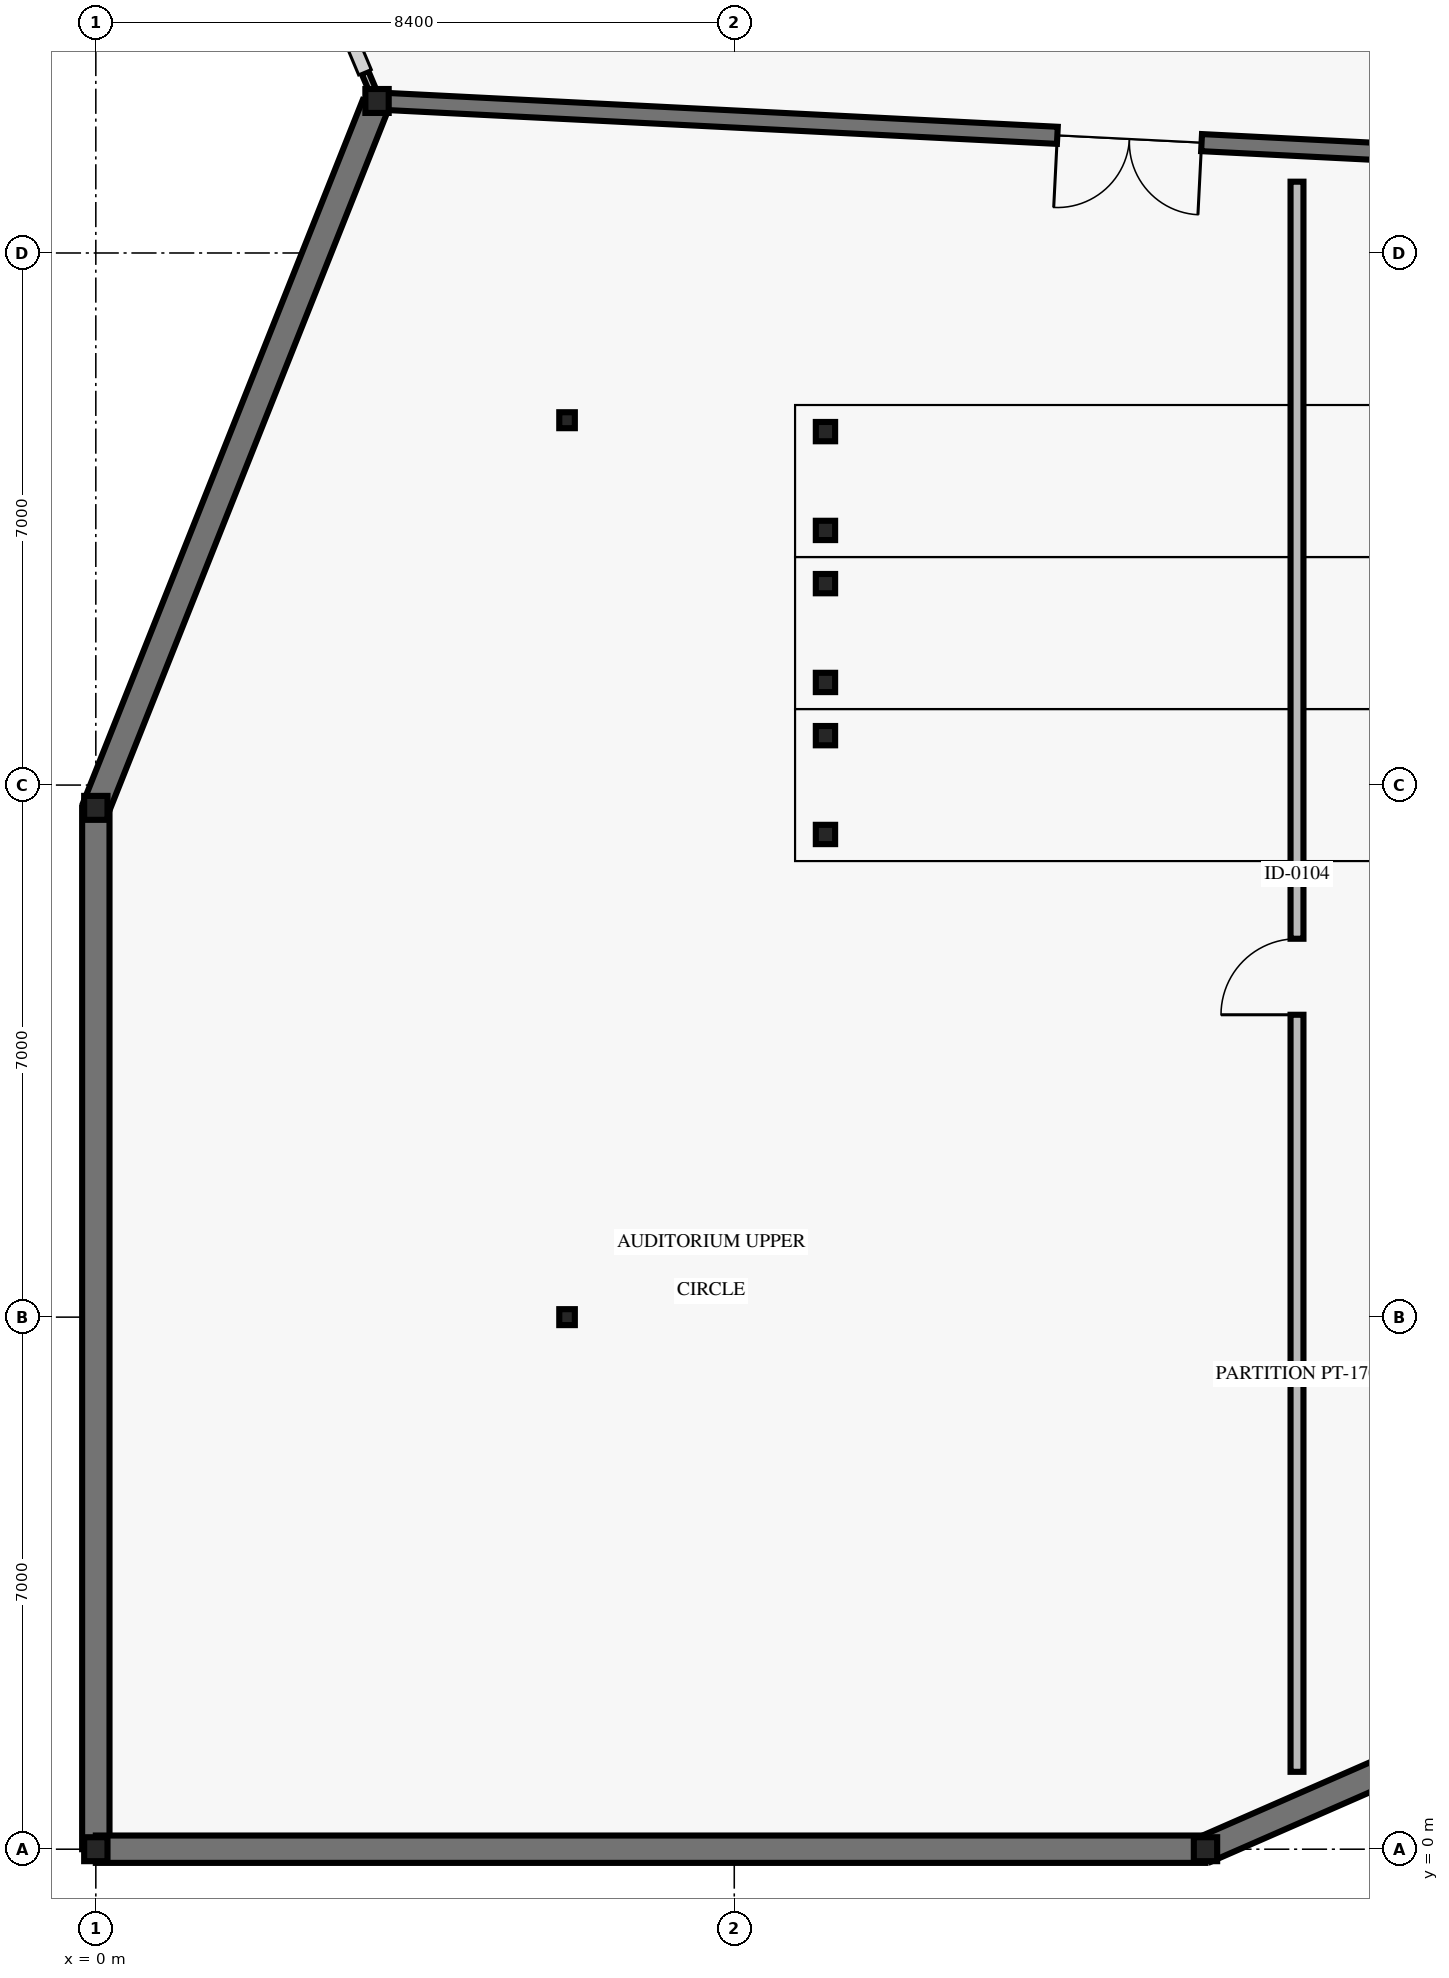
"""IFC4 building model, lengths in metres.
Left out: names, types, materials, properties, quantities, classifications, styles, units other than length and angle.
Written with IfcOpenShell. Run it as: python <this file> out.ifc"""

import sys

from ifc_helpers import new_model, si_unit, direction, frame, frame_2d, origin, origin_2d, place, context, subcontext, project, spatial, rectangle, i_section, extrude, element, fill, save


model = new_model("IFC4")
c1 = context("Model", 3, precision=1e-05, world=origin(), true_north=direction((0.0, 1.0)))
c2 = subcontext(c1, "Body", "Model", "MODEL_VIEW")
j1 = project(units=[si_unit("LENGTHUNIT", "METRE"), si_unit("PLANEANGLEUNIT", "RADIAN")], contexts=[c1])
p1 = place(None, origin())
s1 = spatial("IfcSite", under=j1, at=p1, CompositionType="ELEMENT")
p2 = place(p1, origin())
s2 = spatial("IfcBuilding", under=s1, at=p2, CompositionType="ELEMENT")
p3 = place(p2, frame((0.0, 0.0, 5.4)))
s3 = spatial("IfcBuildingStorey", under=s2, at=p3, CompositionType="ELEMENT", Elevation=5.4)
for number, where, z_axis, x_axis in (
    (1, (0.0, 0.0, 0.0), (0.0, 0.0, 1.0), (1.0, 0.0, 0.0)),
    (2, (0.0, 13.7, 0.0), (0.0, 0.0, 1.0), (1.0, 0.0, 0.0)),
    (3, (3.7, 23.0, 0.0), (0.0, 0.0, 1.0), (1.0, 0.0, 0.0)),
    (4, (14.6, 0.0, 0.0), (0.0, 0.0, 1.0), (1.0, 0.0, 0.0)),
):
    element("IfcColumn", number, at=place(p3, frame(where, z_axis=z_axis, x_axis=x_axis)), inside=s3, PredefinedType="COLUMN", context=c2, shape_type="SweptSolid", body=[
        extrude(i_section(OverallWidth=0.307, OverallDepth=0.315, WebThickness=0.012, FlangeThickness=0.019, FilletRadius=0.017, at=origin_2d()), origin(), (0.0, 0.0, 1.0), 4.8),
    ])
for number, where, z_axis, x_axis in (
    (5, (6.2, 7.0, 0.0), (0.0, 0.0, 1.0), (1.0, 0.0, 0.0)),
    (6, (6.2, 18.8, 0.0), (0.0, 0.0, 1.0), (1.0, 0.0, 0.0)),
):
    element("IfcColumn", number, at=place(p3, frame(where, z_axis=z_axis, x_axis=x_axis)), inside=s3, PredefinedType="COLUMN", context=c2, shape_type="SweptSolid", body=[
        extrude(i_section(OverallWidth=0.205, OverallDepth=0.21, WebThickness=0.009, FlangeThickness=0.014, FilletRadius=0.01, at=origin_2d()), origin(), (0.0, 0.0, 1.0), 4.8),
    ])
for number, where, z_axis, x_axis in (
    (7, (9.6, 13.35, 0.0), (0.0, 0.0, 1.0), (1.0, 0.0, 0.0)),
    (8, (9.6, 14.65, 0.0), (0.0, 0.0, 1.0), (1.0, 0.0, 0.0)),
):
    element("IfcColumn", number, at=place(p3, frame(where, z_axis=z_axis, x_axis=x_axis)), inside=s3, PredefinedType="COLUMN", context=c2, shape_type="SweptSolid", body=[
        extrude(i_section(OverallWidth=0.254, OverallDepth=0.254, WebThickness=0.009, FlangeThickness=0.014, FilletRadius=0.013, at=origin_2d()), origin(), (0.0, 0.0, 1.0), 0.295),
    ])
for number, where, z_axis, x_axis in (
    (9, (9.6, 15.35, 0.0), (0.0, 0.0, 1.0), (1.0, 0.0, 0.0)),
    (10, (9.6, 16.65, 0.0), (0.0, 0.0, 1.0), (1.0, 0.0, 0.0)),
):
    element("IfcColumn", number, at=place(p3, frame(where, z_axis=z_axis, x_axis=x_axis)), inside=s3, PredefinedType="COLUMN", context=c2, shape_type="SweptSolid", body=[
        extrude(i_section(OverallWidth=0.254, OverallDepth=0.254, WebThickness=0.009, FlangeThickness=0.014, FilletRadius=0.013, at=origin_2d()), origin(), (0.0, 0.0, 1.0), 0.745),
    ])
for number, where, z_axis, x_axis in (
    (11, (9.6, 17.35, 0.0), (0.0, 0.0, 1.0), (1.0, 0.0, 0.0)),
    (12, (9.6, 18.65, 0.0), (0.0, 0.0, 1.0), (1.0, 0.0, 0.0)),
):
    element("IfcColumn", number, at=place(p3, frame(where, z_axis=z_axis, x_axis=x_axis)), inside=s3, PredefinedType="COLUMN", context=c2, shape_type="SweptSolid", body=[
        extrude(i_section(OverallWidth=0.254, OverallDepth=0.254, WebThickness=0.009, FlangeThickness=0.014, FilletRadius=0.013, at=origin_2d()), origin(), (0.0, 0.0, 1.0), 1.195),
    ])
p4 = place(p3, frame((0.0, 13.7, 0.0), z_axis=(0.0, 0.0, 1.0), x_axis=(0.36968498985, 0.929157149399, 0.0)))
e13 = element("IfcWall", 13, at=p4, inside=s3, PredefinedType="SOLIDWALL", context=c2, shape_type="SweptSolid", body=[
    extrude(rectangle(XDim=9.949, YDim=0.36, at=frame_2d((4.975, 0.0))), origin(), (0.0, 0.0, 1.0), 3.62),
])
p5 = place(p3, frame((0.0, 0.0, 0.0), z_axis=(0.0, 0.0, 1.0), x_axis=(0.0, 1.0, 0.0)))
e14 = element("IfcWall", 14, at=p5, inside=s3, PredefinedType="SOLIDWALL", context=c2, shape_type="SweptSolid", body=[
    extrude(rectangle(XDim=13.7, YDim=0.36, at=frame_2d((6.85, 0.0))), origin(), (0.0, 0.0, 1.0), 3.62),
])
p6 = place(p3, frame((14.6, 0.0, 0.0), z_axis=(0.0, 0.0, 1.0), x_axis=(-1.0, 0.0, 0.0)))
e15 = element("IfcWall", 15, at=p6, inside=s3, PredefinedType="SOLIDWALL", context=c2, shape_type="SweptSolid", body=[
    extrude(rectangle(XDim=14.6, YDim=0.36, at=frame_2d((7.3, 0.0))), origin(), (0.0, 0.0, 1.0), 3.62),
])
p7 = place(p3, frame((22.545, 3.476, 0.0), z_axis=(0.0, 0.0, 1.0), x_axis=(-0.916148288852, -0.400839510069, 0.0)))
e16 = element("IfcWall", 16, at=p7, inside=s3, PredefinedType="SOLIDWALL", context=c2, shape_type="SweptSolid", body=[
    extrude(rectangle(XDim=8.672, YDim=0.36, at=frame_2d((4.336, 0.0))), origin(), (0.0, 0.0, 1.0), 3.62),
])
p8 = place(p3, frame((3.661, 23.094, 0.0), z_axis=(0.0, 0.0, 1.0), x_axis=(-0.38894215718, 0.921262176782, 0.0)))
e17 = element("IfcWall", 17, at=p8, inside=s3, PredefinedType="SOLIDWALL", context=c2, shape_type="SweptSolid", body=[
    extrude(rectangle(XDim=0.308, YDim=0.095, at=frame_2d((0.154, 0.0))), origin(), (0.0, 0.0, 1.0), 3.62),
])
p9 = place(p3, frame((23.5, 22.0, 0.0), z_axis=(0.0, 0.0, 1.0), x_axis=(-0.99872706092, 0.050440636263, 0.0)))
e18 = element("IfcWall", 18, at=p9, inside=s3, PredefinedType="SOLIDWALL", context=c2, shape_type="SweptSolid", body=[
    extrude(rectangle(XDim=19.825, YDim=0.225, at=frame_2d((9.913, 0.0))), origin(), (0.0, 0.0, 1.0), 4.02),
])
p10 = place(p9, frame((8.963, 0.0, 0.0)))
e19 = element("IfcOpeningElement", 19, at=p10, cuts=e18, PredefinedType="OPENING", context=c2, shape_type="SweptSolid", body=[
    extrude(rectangle(XDim=1.9, YDim=2.35, at=frame_2d((0.95, 1.175))), frame((0.0, 0.123, 0.0), z_axis=(0.0, -1.0, 0.0), x_axis=(1.0, 0.0, 0.0)), (0.0, 0.0, 1.0), 0.245),
])
p11 = place(p3, frame((15.804, 1.018, 0.0), z_axis=(0.0, 0.0, 1.0), x_axis=(0.0, 1.0, 0.0)))
e20 = element("IfcWall", 20, at=p11, inside=s3, PredefinedType="PARTITIONING", context=c2, shape_type="SweptSolid", body=[
    extrude(rectangle(XDim=20.92, YDim=0.17, at=frame_2d((10.46, 0.0))), origin(), (0.0, 0.0, 1.0), 3.32),
])
p12 = place(p11, frame((9.96, 0.0, 0.0)))
e21 = element("IfcOpeningElement", 21, at=p12, cuts=e20, PredefinedType="OPENING", context=c2, shape_type="SweptSolid", body=[
    extrude(rectangle(XDim=1.0, YDim=2.15, at=frame_2d((0.5, 1.075))), frame((0.0, 0.095, 0.0), z_axis=(0.0, -1.0, 0.0), x_axis=(1.0, 0.0, 0.0)), (0.0, 0.0, 1.0), 0.19),
])
p13 = place(p10, origin())
e22 = element("IfcDoor", 22, at=p13, inside=s3, OperationType="DOUBLE_DOOR_SINGLE_SWING", PredefinedType="DOOR", context=c2, shape_type="SweptSolid", body=[
    extrude(rectangle(XDim=1.9, YDim=2.35, at=frame_2d((0.95, 1.175))), frame((0.0, 0.025, 0.0), z_axis=(0.0, -1.0, 0.0), x_axis=(1.0, 0.0, 0.0)), (0.0, 0.0, 1.0), 0.05),
])
fill(e19, e22)
p14 = place(p12, origin())
e23 = element("IfcDoor", 23, at=p14, inside=s3, OperationType="SINGLE_SWING_LEFT", PredefinedType="DOOR", context=c2, shape_type="SweptSolid", body=[
    extrude(rectangle(XDim=1.0, YDim=2.15, at=frame_2d((0.5, 1.075))), frame((0.0, 0.025, 0.0), z_axis=(0.0, -1.0, 0.0), x_axis=(1.0, 0.0, 0.0)), (0.0, 0.0, 1.0), 0.05),
])
fill(e21, e23)
save(model, sys.argv[1])
